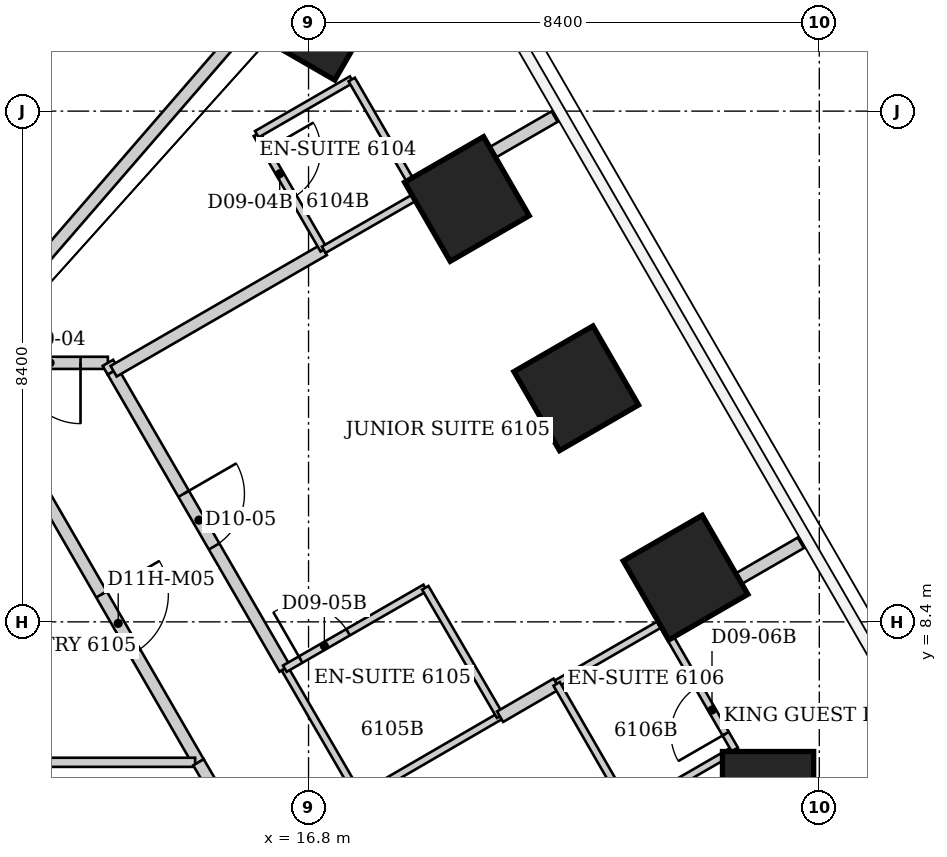
"""IFC4 building model, lengths in metres.
Left out: names, types, materials, properties, quantities, classifications, styles, units other than length and angle.
Written with IfcOpenShell. Run it as: python <this file> out.ifc"""

import sys

from ifc_helpers import new_model, si_unit, direction, frame, frame_2d, origin, origin_2d, place, context, subcontext, project, spatial, rectangle, extrude, element, fill, save


model = new_model("IFC4")
c1 = context("Model", 3, precision=1e-05, world=origin(), true_north=direction((0.0, 1.0)))
c2 = subcontext(c1, "Body", "Model", "MODEL_VIEW")
j1 = project(units=[si_unit("LENGTHUNIT", "METRE"), si_unit("PLANEANGLEUNIT", "RADIAN")], contexts=[c1])
p1 = place(None, origin())
s1 = spatial("IfcSite", under=j1, at=p1, CompositionType="ELEMENT")
p2 = place(p1, origin())
s2 = spatial("IfcBuilding", under=s1, at=p2, CompositionType="ELEMENT")
p3 = place(p2, frame((0.0, 0.0, 244.0)))
s3 = spatial("IfcBuildingStorey", under=s2, at=p3, CompositionType="ELEMENT", Elevation=244.0)
p4 = place(p3, frame((16.632, 18.523, 0.0), z_axis=(-0.047422507184, -0.052869687063, 0.997474762589), x_axis=(0.497441372682, 0.864710520134, 0.069482351101)))
e1 = element("IfcColumn", 1, at=p4, inside=s3, PredefinedType="COLUMN", context=c2, shape_type="SweptSolid", body=[
    extrude(rectangle(XDim=1.5, YDim=2.25, at=origin_2d()), origin(), (0.0, 0.0, 1.0), 3.81),
])
p5 = place(p3, frame((19.405, 15.355, 0.0), z_axis=(-0.05403142055, -0.042686745061, 0.997626406722), x_axis=(0.864743208297, 0.497572308908, 0.068124746696)))
e2 = element("IfcColumn", 2, at=p5, inside=s3, PredefinedType="COLUMN", context=c2, shape_type="SweptSolid", body=[
    extrude(rectangle(XDim=1.5, YDim=1.5, at=origin_2d()), origin(), (0.0, 0.0, 1.0), 3.809),
])
p6 = place(p3, frame((21.203, 12.241, 0.0), z_axis=(-0.05903355077, -0.034099727481, 0.997673417742), x_axis=(0.863904737752, 0.499019891948, 0.068174419916)))
e3 = element("IfcColumn", 3, at=p6, inside=s3, PredefinedType="COLUMN", context=c2, shape_type="SweptSolid", body=[
    extrude(rectangle(XDim=1.5, YDim=1.5, at=origin_2d()), origin(), (0.0, 0.0, 1.0), 3.809),
])
p7 = place(p3, frame((23.0, 9.127, 0.0), z_axis=(-0.064029932807, -0.025445328653, 0.997623527667), x_axis=(0.863429873399, 0.499842225125, 0.068166001086)))
e4 = element("IfcColumn", 4, at=p7, inside=s3, PredefinedType="COLUMN", context=c2, shape_type="SweptSolid", body=[
    extrude(rectangle(XDim=1.5, YDim=1.5, at=origin_2d()), origin(), (0.0, 0.0, 1.0), 3.809),
])
p8 = place(p3, frame((24.357, 5.143, 0.0), z_axis=(-0.069531443306, -0.014675300016, 0.997471811111), x_axis=(0.99757975799, -0.001092604117, 0.069522893098)))
e5 = element("IfcColumn", 5, at=p8, inside=s3, PredefinedType="COLUMN", context=c2, shape_type="SweptSolid", body=[
    extrude(rectangle(XDim=1.5, YDim=2.25, at=origin_2d()), origin(), (0.0, 0.0, 1.0), 3.81),
])
p9 = place(p3, frame((11.04, 12.751, 0.0), z_axis=(0.0, 0.0, 1.0), x_axis=(0.654384042683, 0.756162366613, 0.0)))
e6 = element("IfcWall", 6, at=p9, inside=s3, PredefinedType="PARTITIONING", context=c2, shape_type="SweptSolid", body=[
    extrude(rectangle(XDim=10.667, YDim=0.2, at=frame_2d((5.333, 0.0))), origin(), (0.0, 0.0, 1.0), 3.64),
])
p10 = place(p3, frame((12.35, 10.66, 0.0), z_axis=(0.0, 0.0, 1.0), x_axis=(0.500213626659, -0.86590203124, 0.0)))
e7 = element("IfcWall", 7, at=p10, inside=s3, PredefinedType="PARTITIONING", context=c2, shape_type="SweptSolid", body=[
    extrude(rectangle(XDim=5.278, YDim=0.2, at=frame_2d((2.639, 0.0))), origin(), (0.0, 0.0, 1.0), 3.64),
])
p11 = place(p10, frame((2.089, 0.0, 0.0)))
e8 = element("IfcOpeningElement", 8, at=p11, cuts=e7, PredefinedType="OPENING", context=c2, shape_type="SweptSolid", body=[
    extrude(rectangle(XDim=1.1, YDim=2.2, at=frame_2d((0.55, 1.1))), frame((0.0, 0.1, 0.0), z_axis=(0.0, -1.0, 0.0), x_axis=(1.0, 0.0, 0.0)), (0.0, 0.0, 1.0), 0.2),
])
p12 = place(p3, frame((13.5, 12.66, 0.0), z_axis=(0.0, 0.0, 1.0), x_axis=(-1.0, 0.0, 0.0)))
e9 = element("IfcWall", 9, at=p12, inside=s3, PredefinedType="PARTITIONING", context=c2, shape_type="SweptSolid", body=[
    extrude(rectangle(XDim=2.54, YDim=0.2, at=frame_2d((1.27, 0.0))), origin(), (0.0, 0.0, 1.0), 3.64),
])
p13 = place(p12, frame((0.45, 0.0, 0.0)))
e10 = element("IfcOpeningElement", 10, at=p13, cuts=e9, PredefinedType="OPENING", context=c2, shape_type="SweptSolid", body=[
    extrude(rectangle(XDim=1.0, YDim=2.13, at=frame_2d((0.5, 1.065))), frame((0.0, 0.1, 0.0), z_axis=(0.0, -1.0, 0.0), x_axis=(1.0, 0.0, 0.0)), (0.0, 0.0, 1.0), 0.2),
])
p14 = place(p3, frame((13.5, 12.66, 0.0), z_axis=(0.0, 0.0, 1.0), x_axis=(0.501036270542, -0.865426285481, 0.0)))
e11 = element("IfcWall", 11, at=p14, inside=s3, PredefinedType="PARTITIONING", context=c2, shape_type="SweptSolid", body=[
    extrude(rectangle(XDim=0.166, YDim=0.2, at=frame_2d((0.083, 0.0))), origin(), (0.0, 0.0, 1.0), 3.64),
])
p15 = place(p3, frame((13.583, 12.516, 0.0), z_axis=(0.0, 0.0, 1.0), x_axis=(0.500743006408, -0.865596003649, 0.0)))
e12 = element("IfcWall", 12, at=p15, inside=s3, PredefinedType="PARTITIONING", context=c2, shape_type="SweptSolid", body=[
    extrude(rectangle(XDim=5.645, YDim=0.2, at=frame_2d((2.823, 0.0))), origin(), (0.0, 0.0, 1.0), 3.64),
])
p16 = place(p15, frame((2.323, 0.0, 0.0)))
e13 = element("IfcOpeningElement", 13, at=p16, cuts=e12, PredefinedType="OPENING", context=c2, shape_type="SweptSolid", body=[
    extrude(rectangle(XDim=1.0, YDim=2.13, at=frame_2d((0.5, 1.065))), frame((0.0, 0.1, 0.0), z_axis=(0.0, -1.0, 0.0), x_axis=(1.0, 0.0, 0.0)), (0.0, 0.0, 1.0), 0.2),
])
p17 = place(p3, frame((13.594, 12.522, 0.0), z_axis=(0.0, 0.0, 1.0), x_axis=(0.866085778049, 0.499895414124, 0.0)))
e14 = element("IfcWall", 14, at=p17, inside=s3, PredefinedType="PARTITIONING", context=c2, shape_type="SweptSolid", body=[
    extrude(rectangle(XDim=3.991, YDim=0.2, at=frame_2d((1.996, 0.0))), origin(), (0.0, 0.0, 1.0), 3.64),
])
p18 = place(p3, frame((14.935, 6.09, 0.0), z_axis=(0.0, 0.0, 1.0), x_axis=(-1.0, 0.0, 0.0)))
e15 = element("IfcWall", 15, at=p18, inside=s3, PredefinedType="PARTITIONING", context=c2, shape_type="SweptSolid", body=[
    extrude(rectangle(XDim=4.385, YDim=0.15, at=frame_2d((2.192, 0.0))), origin(), (0.0, 0.0, 1.0), 3.64),
])
p19 = place(p3, frame((14.99, 6.09, 0.0), z_axis=(0.0, 0.0, 1.0), x_axis=(0.503816387241, -0.863810770914, 0.0)))
e16 = element("IfcWall", 16, at=p19, inside=s3, PredefinedType="PARTITIONING", context=c2, shape_type="SweptSolid", body=[
    extrude(rectangle(XDim=0.833, YDim=0.2, at=frame_2d((0.417, 0.0))), origin(), (0.0, 0.0, 1.0), 3.64),
])
p20 = place(p3, frame((15.95, 16.42, 0.0), z_axis=(0.0, 0.0, 1.0), x_axis=(0.501088872721, -0.865395829453, 0.0)))
e17 = element("IfcWall", 17, at=p20, inside=s3, PredefinedType="PARTITIONING", context=c2, shape_type="SweptSolid", body=[
    extrude(rectangle(XDim=2.195, YDim=0.12, at=frame_2d((1.098, 0.0))), origin(), (0.0, 0.0, 1.0), 3.64),
])
p21 = place(p20, frame((0.3, 0.0, 0.0)))
e18 = element("IfcOpeningElement", 18, at=p21, cuts=e17, PredefinedType="OPENING", context=c2, shape_type="SweptSolid", body=[
    extrude(rectangle(XDim=0.9, YDim=2.03, at=frame_2d((0.45, 1.015))), frame((0.0, 0.06, 0.0), z_axis=(0.0, -1.0, 0.0), x_axis=(1.0, 0.0, 0.0)), (0.0, 0.0, 1.0), 0.12),
])
p22 = place(p3, frame((16.41, 7.63, 0.0), z_axis=(0.0, 0.0, 1.0), x_axis=(0.501856726365, -0.86495076519, 0.0)))
e19 = element("IfcWall", 19, at=p22, inside=s3, PredefinedType="PARTITIONING", context=c2, shape_type="SweptSolid", body=[
    extrude(rectangle(XDim=2.451, YDim=0.12, at=frame_2d((1.226, 0.0))), origin(), (0.0, 0.0, 1.0), 3.64),
])
for number, where, z_axis, x_axis in (
    (20, (17.05, 14.52, 0.0), (0.0, 0.0, 1.0), (0.867, 0.499, 0.0)),
    (21, (17.51, 17.32, 0.0), (0.0, 0.0, 1.0), (-0.866, -0.5, 0.0)),
):
    element("IfcWall", number, at=place(p3, frame(where, z_axis=z_axis, x_axis=x_axis)), inside=s3, PredefinedType="PARTITIONING", context=c2, shape_type="SweptSolid", body=[
        extrude(rectangle(XDim=1.801, YDim=0.12, at=frame_2d((0.9, 0.0))), origin(), (0.0, 0.0, 1.0), 3.64),
    ])
p23 = place(p3, frame((17.64, 5.51, 0.0), z_axis=(0.0, 0.0, 1.0), x_axis=(0.86498992408, 0.501789229896, 0.0)))
e22 = element("IfcWall", 22, at=p23, inside=s3, PredefinedType="PARTITIONING", context=c2, shape_type="SweptSolid", body=[
    extrude(rectangle(XDim=2.671, YDim=0.12, at=frame_2d((1.335, 0.0))), origin(), (0.0, 0.0, 1.0), 3.64),
])
p24 = place(p3, frame((18.61, 15.42, 0.0), z_axis=(0.0, 0.0, 1.0), x_axis=(-0.501040653706, 0.865423747845, 0.0)))
e23 = element("IfcWall", 23, at=p24, inside=s3, PredefinedType="PARTITIONING", context=c2, shape_type="SweptSolid", body=[
    extrude(rectangle(XDim=2.196, YDim=0.12, at=frame_2d((1.098, 0.0))), origin(), (0.0, 0.0, 1.0), 2.14),
])
p25 = place(p3, frame((18.611, 15.418, 0.0), z_axis=(0.0, 0.0, 1.0), x_axis=(0.865870535136, 0.500268144481, 0.0)))
e24 = element("IfcWall", 24, at=p25, inside=s3, PredefinedType="PARTITIONING", context=c2, shape_type="SweptSolid", body=[
    extrude(rectangle(XDim=2.582, YDim=0.2, at=frame_2d((1.291, 0.0))), origin(), (0.0, 0.0, 1.0), 3.64),
])
p26 = place(p3, frame((18.72, 8.96, 0.0), z_axis=(0.0, 0.0, 1.0), x_axis=(-0.866654860089, -0.498908161372, 0.0)))
e25 = element("IfcWall", 25, at=p26, inside=s3, PredefinedType="PARTITIONING", context=c2, shape_type="SweptSolid", body=[
    extrude(rectangle(XDim=2.666, YDim=0.12, at=frame_2d((1.333, 0.0))), origin(), (0.0, 0.0, 1.0), 3.64),
])
p27 = place(p26, frame((1.466, 0.0, 0.0)))
e26 = element("IfcOpeningElement", 26, at=p27, cuts=e25, PredefinedType="OPENING", context=c2, shape_type="SweptSolid", body=[
    extrude(rectangle(XDim=0.9, YDim=2.03, at=frame_2d((0.45, 1.015))), frame((0.0, 0.06, 0.0), z_axis=(0.0, -1.0, 0.0), x_axis=(1.0, 0.0, 0.0)), (0.0, 0.0, 1.0), 0.12),
])
p28 = place(p3, frame((19.95, 6.85, 0.0), z_axis=(0.0, 0.0, 1.0), x_axis=(-0.503634814725, 0.863916647251, 0.0)))
e27 = element("IfcWall", 27, at=p28, inside=s3, PredefinedType="PARTITIONING", context=c2, shape_type="SweptSolid", body=[
    extrude(rectangle(XDim=2.442, YDim=0.12, at=frame_2d((1.221, 0.0))), origin(), (0.0, 0.0, 1.0), 3.64),
])
p29 = place(p3, frame((20.878, 7.383, 0.0), z_axis=(0.0, 0.0, 1.0), x_axis=(0.866697688948, 0.498833755847, 0.0)))
e28 = element("IfcWall", 28, at=p29, inside=s3, PredefinedType="PARTITIONING", context=c2, shape_type="SweptSolid", body=[
    extrude(rectangle(XDim=1.998, YDim=0.12, at=frame_2d((0.999, 0.0))), origin(), (0.0, 0.0, 1.0), 3.64),
])
p30 = place(p3, frame((20.88, 7.38, 0.0), z_axis=(0.0, 0.0, 1.0), x_axis=(-0.864855730486, -0.502020483094, 0.0)))
e29 = element("IfcWall", 29, at=p30, inside=s3, PredefinedType="PARTITIONING", context=c2, shape_type="SweptSolid", body=[
    extrude(rectangle(XDim=1.075, YDim=0.2, at=frame_2d((0.538, 0.0))), origin(), (0.0, 0.0, 1.0), 3.64),
])
p31 = place(p3, frame((20.88, 7.38, 0.0), z_axis=(0.0, 0.0, 1.0), x_axis=(0.499813401482, -0.866133109688, 0.0)))
e30 = element("IfcWall", 30, at=p31, inside=s3, PredefinedType="PARTITIONING", context=c2, shape_type="SweptSolid", body=[
    extrude(rectangle(XDim=2.401, YDim=0.12, at=frame_2d((1.201, 0.0))), origin(), (0.0, 0.0, 1.0), 3.64),
])
p32 = place(p3, frame((22.08, 5.3, 0.0), z_axis=(0.0, 0.0, 1.0), x_axis=(0.865766263046, 0.50044857655, 0.0)))
e31 = element("IfcWall", 31, at=p32, inside=s3, PredefinedType="PARTITIONING", context=c2, shape_type="SweptSolid", body=[
    extrude(rectangle(XDim=1.998, YDim=0.12, at=frame_2d((0.999, 0.0))), origin(), (0.0, 0.0, 1.0), 3.64),
])
p33 = place(p3, frame((22.61, 8.38, 0.0), z_axis=(0.0, 0.0, 1.0), x_axis=(0.865974560031, 0.500088053625, 0.0)))
e32 = element("IfcWall", 32, at=p33, inside=s3, PredefinedType="PARTITIONING", context=c2, shape_type="SweptSolid", body=[
    extrude(rectangle(XDim=2.64, YDim=0.2, at=frame_2d((1.32, 0.0))), origin(), (0.0, 0.0, 1.0), 3.64),
])
p34 = place(p3, frame((23.81, 6.3, 0.0), z_axis=(0.0, 0.0, 1.0), x_axis=(-0.499737123639, 0.866177122335, 0.0)))
e33 = element("IfcWall", 33, at=p34, inside=s3, PredefinedType="PARTITIONING", context=c2, shape_type="SweptSolid", body=[
    extrude(rectangle(XDim=2.401, YDim=0.12, at=frame_2d((1.201, 0.0))), origin(), (0.0, 0.0, 1.0), 2.14),
])
p35 = place(p34, frame((0.3, 0.0, 0.0)))
e34 = element("IfcOpeningElement", 34, at=p35, cuts=e33, PredefinedType="OPENING", context=c2, shape_type="SweptSolid", body=[
    extrude(rectangle(XDim=0.9, YDim=2.03, at=frame_2d((0.45, 1.015))), frame((0.0, 0.06, 0.0), z_axis=(0.0, -1.0, 0.0), x_axis=(1.0, 0.0, 0.0)), (0.0, 0.0, 1.0), 0.12),
])
p36 = place(p13, origin())
e35 = element("IfcDoor", 35, at=p36, inside=s3, OperationType="SINGLE_SWING_LEFT", PredefinedType="DOOR", context=c2, shape_type="SweptSolid", body=[
    extrude(rectangle(XDim=1.0, YDim=2.13, at=frame_2d((0.5, 1.065))), frame((0.0, 0.025, 0.0), z_axis=(0.0, -1.0, 0.0), x_axis=(1.0, 0.0, 0.0)), (0.0, 0.0, 1.0), 0.05),
])
fill(e10, e35)
p37 = place(p21, origin())
e36 = element("IfcDoor", 36, at=p37, inside=s3, OperationType="SINGLE_SWING_LEFT", PredefinedType="DOOR", context=c2, shape_type="SweptSolid", body=[
    extrude(rectangle(XDim=0.9, YDim=2.03, at=frame_2d((0.45, 1.015))), frame((0.0, 0.025, 0.0), z_axis=(0.0, -1.0, 0.0), x_axis=(1.0, 0.0, 0.0)), (0.0, 0.0, 1.0), 0.05),
])
fill(e18, e36)
p38 = place(p16, origin())
e37 = element("IfcDoor", 37, at=p38, inside=s3, OperationType="SINGLE_SWING_LEFT", PredefinedType="DOOR", context=c2, shape_type="SweptSolid", body=[
    extrude(rectangle(XDim=1.0, YDim=2.13, at=frame_2d((0.5, 1.065))), frame((0.0, 0.025, 0.0), z_axis=(0.0, -1.0, 0.0), x_axis=(1.0, 0.0, 0.0)), (0.0, 0.0, 1.0), 0.05),
])
fill(e13, e37)
p39 = place(p27, origin())
e38 = element("IfcDoor", 38, at=p39, inside=s3, OperationType="SINGLE_SWING_RIGHT", PredefinedType="DOOR", context=c2, shape_type="SweptSolid", body=[
    extrude(rectangle(XDim=0.9, YDim=2.03, at=frame_2d((0.45, 1.015))), frame((0.0, 0.025, 0.0), z_axis=(0.0, -1.0, 0.0), x_axis=(1.0, 0.0, 0.0)), (0.0, 0.0, 1.0), 0.05),
])
fill(e26, e38)
p40 = place(p35, origin())
e39 = element("IfcDoor", 39, at=p40, inside=s3, OperationType="SINGLE_SWING_LEFT", PredefinedType="DOOR", context=c2, shape_type="SweptSolid", body=[
    extrude(rectangle(XDim=0.9, YDim=2.03, at=frame_2d((0.45, 1.015))), frame((0.0, 0.025, 0.0), z_axis=(0.0, -1.0, 0.0), x_axis=(1.0, 0.0, 0.0)), (0.0, 0.0, 1.0), 0.05),
])
fill(e34, e39)
p41 = place(p11, origin())
e40 = element("IfcDoor", 40, at=p41, inside=s3, OperationType="SINGLE_SWING_LEFT", PredefinedType="DOOR", context=c2, shape_type="SweptSolid", body=[
    extrude(rectangle(XDim=1.1, YDim=2.2, at=frame_2d((0.55, 1.1))), frame((0.0, 0.025, 0.0), z_axis=(0.0, -1.0, 0.0), x_axis=(1.0, 0.0, 0.0)), (0.0, 0.0, 1.0), 0.05),
])
fill(e8, e40)
save(model, sys.argv[1])
